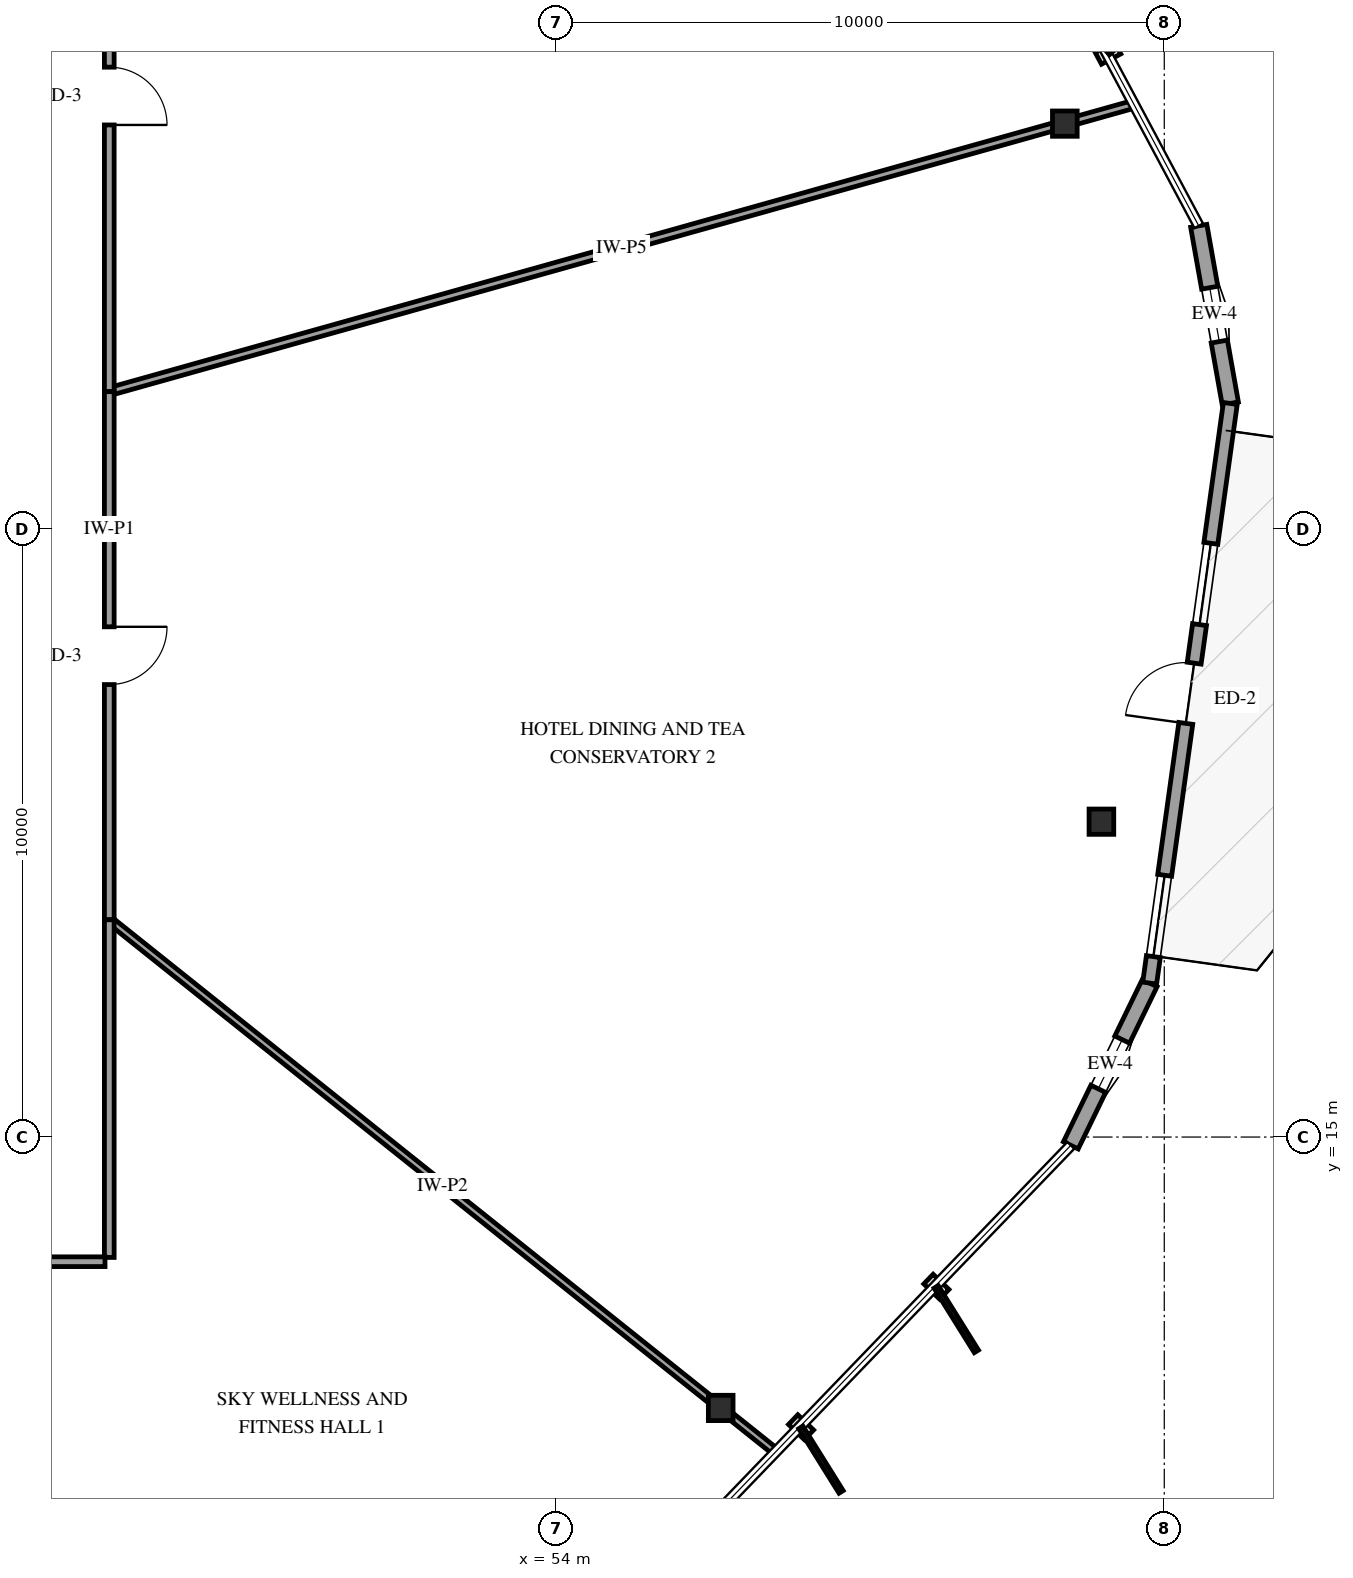
"""IFC4 building model, lengths in metres.
Left out: names, types, materials, properties, quantities, classifications, styles, units other than length and angle.
Written with IfcOpenShell. Run it as: python <this file> out.ifc"""

import sys

from ifc_helpers import new_model, si_unit, direction, frame, frame_2d, origin, origin_2d, place, context, subcontext, project, spatial, rectangle, i_section, extrude, element, fill, save


model = new_model("IFC4")
c1 = context("Model", 3, precision=1e-05, world=origin(), true_north=direction((0.0, 1.0)))
c2 = subcontext(c1, "Body", "Model", "MODEL_VIEW")
j1 = project(units=[si_unit("LENGTHUNIT", "METRE"), si_unit("PLANEANGLEUNIT", "RADIAN")], contexts=[c1])
p1 = place(None, origin())
s1 = spatial("IfcSite", under=j1, at=p1, CompositionType="ELEMENT")
p2 = place(p1, origin())
s2 = spatial("IfcBuilding", under=s1, at=p2, CompositionType="ELEMENT")
p3 = place(p2, frame((0.0, 0.0, 205.0)))
s3 = spatial("IfcBuildingStorey", under=s2, at=p3, CompositionType="ELEMENT", Elevation=205.0)
for number, where, z_axis, x_axis in (
    (1, (62.365, 31.666, 0.0), (0.0, 0.0, 1.0), (1.0, 0.0, 0.0)),
    (2, (56.705, 10.545, 0.0), (0.0, 0.0, 1.0), (1.0, 0.0, 0.0)),
    (3, (62.966, 20.186, 0.0), (0.0, 0.0, 1.0), (1.0, 0.0, 0.0)),
):
    element("IfcColumn", number, at=place(p3, frame(where, z_axis=z_axis, x_axis=x_axis)), inside=s3, PredefinedType="COLUMN", context=c2, shape_type="SweptSolid", body=[
        extrude(i_section(OverallWidth=0.406, OverallDepth=0.416, WebThickness=0.03, FlangeThickness=0.048, FilletRadius=0.038, at=origin_2d()), origin(), (0.0, 0.0, 1.0), 3.6),
    ])
p4 = place(p3, frame((62.463, 14.864, 0.0), z_axis=(0.0, 0.0, 1.0), x_axis=(0.437111339514, 0.899407403165, 0.0)))
e4 = element("IfcWall", 4, at=p4, inside=s3, PredefinedType="SOLIDWALL", context=c2, shape_type="SweptSolid", body=[
    extrude(rectangle(XDim=2.966, YDim=0.27, at=frame_2d((1.483, 0.0))), origin(), (0.0, 0.0, 1.0), 2.679),
])
p5 = place(p4, frame((1.033, 0.0, 0.75)))
e5 = element("IfcOpeningElement", 5, at=p5, cuts=e4, PredefinedType="OPENING", context=c2, shape_type="SweptSolid", body=[
    extrude(rectangle(XDim=0.9, YDim=1.5, at=frame_2d((0.45, 0.75))), frame((0.0, 0.145, 0.0), z_axis=(0.0, -1.0, 0.0), x_axis=(1.0, 0.0, 0.0)), (0.0, 0.0, 1.0), 0.29),
])
p6 = place(p3, frame((65.086, 27.064, 0.0), z_axis=(0.0, 0.0, 1.0), x_axis=(-0.175052836201, 0.984559040656, 0.0)))
e6 = element("IfcWall", 6, at=p6, inside=s3, PredefinedType="SOLIDWALL", context=c2, shape_type="SweptSolid", body=[
    extrude(rectangle(XDim=2.967, YDim=0.27, at=frame_2d((1.483, 0.0))), origin(), (0.0, 0.0, 1.0), 2.679),
])
p7 = place(p6, frame((1.033, 0.0, 0.75)))
e7 = element("IfcOpeningElement", 7, at=p7, cuts=e6, PredefinedType="OPENING", context=c2, shape_type="SweptSolid", body=[
    extrude(rectangle(XDim=0.9, YDim=1.5, at=frame_2d((0.45, 0.75))), frame((0.0, 0.145, 0.0), z_axis=(0.0, -1.0, 0.0), x_axis=(1.0, 0.0, 0.0)), (0.0, 0.0, 1.0), 0.29),
])
p8 = place(p3, frame((63.76, 17.532, 0.0), z_axis=(0.0, 0.0, 1.0), x_axis=(0.137794425401, 0.990460850477, 0.0)))
e8 = element("IfcWall", 8, at=p8, inside=s3, PredefinedType="SOLIDWALL", context=c2, shape_type="SweptSolid", body=[
    extrude(rectangle(XDim=9.624, YDim=0.23, at=frame_2d((4.812, 0.0))), origin(), (0.0, 0.0, 1.0), 2.679),
])
p9 = place(p8, frame((4.312, 0.0, 0.0)))
e9 = element("IfcOpeningElement", 9, at=p9, cuts=e8, PredefinedType="OPENING", context=c2, shape_type="SweptSolid", body=[
    extrude(rectangle(XDim=1.0, YDim=2.15, at=frame_2d((0.5, 1.075))), frame((0.0, 0.125, 0.0), z_axis=(0.0, -1.0, 0.0), x_axis=(1.0, 0.0, 0.0)), (0.0, 0.0, 1.0), 0.25),
])
p10 = place(p8, frame((0.44, 0.0, 0.72)))
e10 = element("IfcOpeningElement", 10, at=p10, cuts=e8, PredefinedType="OPENING", context=c2, shape_type="SweptSolid", body=[
    extrude(rectangle(XDim=1.35, YDim=1.65, at=frame_2d((0.675, 0.825))), frame((0.0, 0.125, 0.0), z_axis=(0.0, -1.0, 0.0), x_axis=(1.0, 0.0, 0.0)), (0.0, 0.0, 1.0), 0.25),
])
p11 = place(p8, frame((5.952, 0.0, 0.72)))
e11 = element("IfcOpeningElement", 11, at=p11, cuts=e8, PredefinedType="OPENING", context=c2, shape_type="SweptSolid", body=[
    extrude(rectangle(XDim=1.35, YDim=1.65, at=frame_2d((0.675, 0.825))), frame((0.0, 0.125, 0.0), z_axis=(0.0, -1.0, 0.0), x_axis=(1.0, 0.0, 0.0)), (0.0, 0.0, 1.0), 0.25),
])
p12 = place(p3, frame((63.5, 31.984, 0.0), z_axis=(0.0, 0.0, 1.0), x_axis=(-0.962848165135, -0.270043350032, 0.0)))
e12 = element("IfcWall", 12, at=p12, inside=s3, PredefinedType="PARTITIONING", context=c2, shape_type="SweptSolid", body=[
    extrude(rectangle(XDim=17.5, YDim=0.13, at=frame_2d((8.75, 0.0))), origin(), (0.0, 0.0, 1.0), 3.3),
])
p13 = place(p3, frame((46.65, 18.573, 0.0), z_axis=(0.0, 0.0, 1.0), x_axis=(0.781466310876, -0.623947437663, 0.0)))
e13 = element("IfcWall", 13, at=p13, inside=s3, PredefinedType="PARTITIONING", context=c2, shape_type="SweptSolid", body=[
    extrude(rectangle(XDim=14.024, YDim=0.12, at=frame_2d((7.012, 0.0))), origin(), (0.0, 0.0, 1.0), 3.3),
])
p14 = place(p3, frame((46.65, 36.98, 0.0), z_axis=(0.0, 0.0, 1.0), x_axis=(0.0, -1.0, 0.0)))
e14 = element("IfcWall", 14, at=p14, inside=s3, PredefinedType="PARTITIONING", context=c2, shape_type="SweptSolid", body=[
    extrude(rectangle(XDim=9.722, YDim=0.16, at=frame_2d((4.861, 0.0))), origin(), (0.0, 0.0, 1.0), 3.3),
])
p15 = place(p14, frame((4.386, 0.0, 0.0)))
e15 = element("IfcOpeningElement", 15, at=p15, cuts=e14, PredefinedType="OPENING", context=c2, shape_type="SweptSolid", body=[
    extrude(rectangle(XDim=0.95, YDim=2.15, at=frame_2d((0.475, 1.075))), frame((0.0, 0.09, 0.0), z_axis=(0.0, -1.0, 0.0), x_axis=(1.0, 0.0, 0.0)), (0.0, 0.0, 1.0), 0.18),
])
p16 = place(p3, frame((46.65, 27.258, 0.0), z_axis=(0.0, 0.0, 1.0), x_axis=(0.0, -1.0, 0.0)))
e16 = element("IfcWall", 16, at=p16, inside=s3, PredefinedType="PARTITIONING", context=c2, shape_type="SweptSolid", body=[
    extrude(rectangle(XDim=8.685, YDim=0.16, at=frame_2d((4.343, 0.0))), origin(), (0.0, 0.0, 1.0), 3.3),
])
p17 = place(p16, frame((3.867, 0.0, 0.0)))
e17 = element("IfcOpeningElement", 17, at=p17, cuts=e16, PredefinedType="OPENING", context=c2, shape_type="SweptSolid", body=[
    extrude(rectangle(XDim=0.95, YDim=2.15, at=frame_2d((0.475, 1.075))), frame((0.0, 0.09, 0.0), z_axis=(0.0, -1.0, 0.0), x_axis=(1.0, 0.0, 0.0)), (0.0, 0.0, 1.0), 0.18),
])
p18 = place(p3, frame((46.65, 18.573, 0.0), z_axis=(0.0, 0.0, 1.0), x_axis=(0.0, -1.0, 0.0)))
e18 = element("IfcWall", 18, at=p18, inside=s3, PredefinedType="PARTITIONING", context=c2, shape_type="SweptSolid", body=[
    extrude(rectangle(XDim=5.553, YDim=0.16, at=frame_2d((2.776, 0.0))), origin(), (0.0, 0.0, 1.0), 3.3),
])
p19 = place(p3, frame((46.58, 12.95, 0.0), z_axis=(0.0, 0.0, 1.0), x_axis=(-1.0, 0.0, 0.0)))
e19 = element("IfcWall", 19, at=p19, inside=s3, PredefinedType="PARTITIONING", context=c2, shape_type="SweptSolid", body=[
    extrude(rectangle(XDim=3.31, YDim=0.16, at=frame_2d((1.655, 0.0))), origin(), (0.0, 0.0, 1.0), 3.3),
])
p20 = place(p5, origin())
e20 = element("IfcWindow", 20, at=p20, inside=s3, PartitioningType="SINGLE_PANEL", PredefinedType="WINDOW", context=c2, shape_type="SweptSolid", body=[
    extrude(rectangle(XDim=0.9, YDim=1.5, at=frame_2d((0.45, 0.75))), frame((0.0, 0.03, 0.0), z_axis=(0.0, -1.0, 0.0), x_axis=(1.0, 0.0, 0.0)), (0.0, 0.0, 1.0), 0.06),
])
fill(e5, e20)
p21 = place(p7, origin())
e21 = element("IfcWindow", 21, at=p21, inside=s3, PartitioningType="SINGLE_PANEL", PredefinedType="WINDOW", context=c2, shape_type="SweptSolid", body=[
    extrude(rectangle(XDim=0.9, YDim=1.5, at=frame_2d((0.45, 0.75))), frame((0.0, 0.03, 0.0), z_axis=(0.0, -1.0, 0.0), x_axis=(1.0, 0.0, 0.0)), (0.0, 0.0, 1.0), 0.06),
])
fill(e7, e21)
p22 = place(p9, origin())
e22 = element("IfcDoor", 22, at=p22, inside=s3, OperationType="SINGLE_SWING_LEFT", PredefinedType="DOOR", context=c2, shape_type="SweptSolid", body=[
    extrude(rectangle(XDim=1.0, YDim=2.15, at=frame_2d((0.5, 1.075))), frame((0.0, 0.025, 0.0), z_axis=(0.0, -1.0, 0.0), x_axis=(1.0, 0.0, 0.0)), (0.0, 0.0, 1.0), 0.05),
])
fill(e9, e22)
p23 = place(p10, origin())
e23 = element("IfcWindow", 23, at=p23, inside=s3, PartitioningType="SINGLE_PANEL", PredefinedType="WINDOW", context=c2, shape_type="SweptSolid", body=[
    extrude(rectangle(XDim=1.35, YDim=1.65, at=frame_2d((0.675, 0.825))), frame((0.0, 0.03, 0.0), z_axis=(0.0, -1.0, 0.0), x_axis=(1.0, 0.0, 0.0)), (0.0, 0.0, 1.0), 0.06),
])
fill(e10, e23)
p24 = place(p11, origin())
e24 = element("IfcWindow", 24, at=p24, inside=s3, PartitioningType="SINGLE_PANEL", PredefinedType="WINDOW", context=c2, shape_type="SweptSolid", body=[
    extrude(rectangle(XDim=1.35, YDim=1.65, at=frame_2d((0.675, 0.825))), frame((0.0, 0.03, 0.0), z_axis=(0.0, -1.0, 0.0), x_axis=(1.0, 0.0, 0.0)), (0.0, 0.0, 1.0), 0.06),
])
fill(e11, e24)
p25 = place(p15, origin())
e25 = element("IfcDoor", 25, at=p25, inside=s3, OperationType="SINGLE_SWING_RIGHT", PredefinedType="DOOR", context=c2, shape_type="SweptSolid", body=[
    extrude(rectangle(XDim=0.95, YDim=2.15, at=frame_2d((0.475, 1.075))), frame((0.0, 0.025, 0.0), z_axis=(0.0, -1.0, 0.0), x_axis=(1.0, 0.0, 0.0)), (0.0, 0.0, 1.0), 0.05),
])
fill(e15, e25)
p26 = place(p17, origin())
e26 = element("IfcDoor", 26, at=p26, inside=s3, OperationType="SINGLE_SWING_LEFT", PredefinedType="DOOR", context=c2, shape_type="SweptSolid", body=[
    extrude(rectangle(XDim=0.95, YDim=2.15, at=frame_2d((0.475, 1.075))), frame((0.0, 0.025, 0.0), z_axis=(0.0, -1.0, 0.0), x_axis=(1.0, 0.0, 0.0)), (0.0, 0.0, 1.0), 0.05),
])
fill(e17, e26)
save(model, sys.argv[1])
